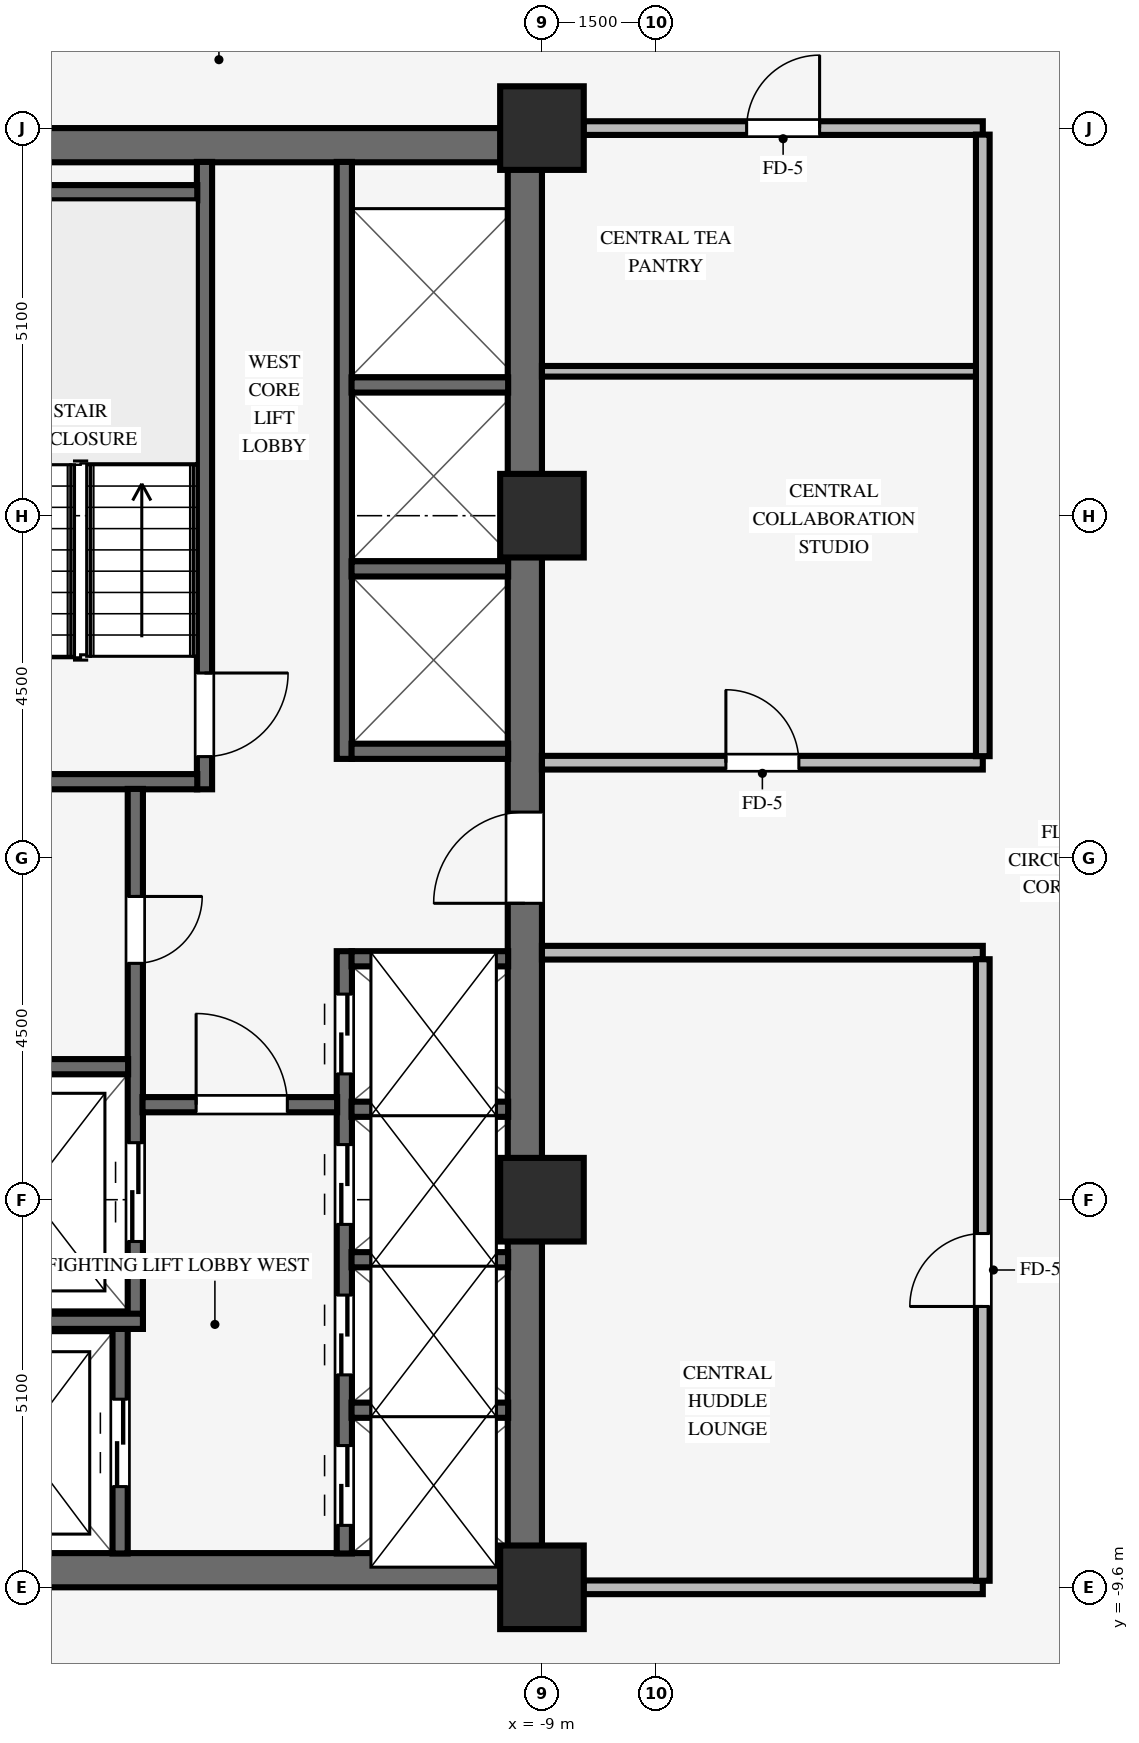
"""IFC4 building model, lengths in metres.
Left out: names, types, materials, properties, quantities, classifications, styles, units other than length and angle.
Written with IfcOpenShell. Run it as: python <this file> out.ifc"""

import sys

from ifc_helpers import new_model, si_unit, direction, frame, frame_2d, origin, origin_2d, place, context, subcontext, project, spatial, rectangle, extrude, source, transform, mapped, element, fill, save


model = new_model("IFC4")
c1 = context("Model", 3, precision=1e-05, world=origin(), true_north=direction((0.0, 1.0)))
c2 = subcontext(c1, "Body", "Model", "MODEL_VIEW")
j1 = project(units=[si_unit("LENGTHUNIT", "METRE"), si_unit("PLANEANGLEUNIT", "RADIAN")], contexts=[c1])
p1 = place(None, origin())
s1 = spatial("IfcSite", under=j1, at=p1, CompositionType="ELEMENT")
p2 = place(p1, origin())
s2 = spatial("IfcBuilding", under=s1, at=p2, CompositionType="ELEMENT")
p3 = place(p2, frame((0.0, 0.0, 64.1)))
s3 = spatial("IfcBuildingStorey", under=s2, at=p3, CompositionType="ELEMENT", Elevation=64.1)
for number, where, z_axis, x_axis in (
    (1, (-17.5, -9.375, 0.0), (0.0, 0.0, 1.0), (1.0, 0.0, 0.0)),
    (2, (-17.5, 9.375, 0.0), (0.0, 0.0, 1.0), (1.0, 0.0, 0.0)),
):
    element("IfcWall", number, at=place(p3, frame(where, z_axis=z_axis, x_axis=x_axis)), inside=s3, PredefinedType="SHEAR", context=c2, shape_type="SweptSolid", body=[
        extrude(rectangle(XDim=8.5, YDim=0.45, at=frame_2d((4.25, 0.0))), origin(), (0.0, 0.0, 1.0), 3.37),
    ])
p4 = place(p3, frame((-9.225, -9.155, 0.0), z_axis=(0.0, 0.0, 1.0), x_axis=(0.0, 1.0, 0.0)))
e3 = element("IfcWall", 3, at=p4, inside=s3, PredefinedType="SHEAR", context=c2, shape_type="SweptSolid", body=[
    extrude(rectangle(XDim=18.31, YDim=0.45, at=frame_2d((9.155, 0.0))), origin(), (0.0, 0.0, 1.0), 3.37),
])
p5 = place(p4, frame((8.555, 0.0, 0.0)))
e4 = element("IfcOpeningElement", 4, at=p5, cuts=e3, PredefinedType="OPENING", context=c2, shape_type="SweptSolid", body=[
    extrude(rectangle(XDim=1.2, YDim=2.15, at=frame_2d((0.6, 1.075))), frame((0.0, 0.235, 0.0), z_axis=(0.0, -1.0, 0.0), x_axis=(1.0, 0.0, 0.0)), (0.0, 0.0, 1.0), 0.47),
])
for number, where, z_axis, x_axis in (
    (5, (-9.0, -9.6, 0.0), (0.0, 0.0, 1.0), (1.0, 0.0, 0.0)),
    (6, (-9.0, -4.5, 0.0), (0.0, 0.0, 1.0), (1.0, 0.0, 0.0)),
    (7, (-9.0, 4.5, 0.0), (0.0, 0.0, 1.0), (1.0, 0.0, 0.0)),
    (8, (-9.0, 9.6, 0.0), (0.0, 0.0, 1.0), (1.0, 0.0, 0.0)),
):
    element("IfcColumn", number, at=place(p3, frame(where, z_axis=z_axis, x_axis=x_axis)), inside=s3, PredefinedType="COLUMN", context=c2, shape_type="SweptSolid", body=[
        extrude(rectangle(XDim=1.1, YDim=1.1, at=origin_2d()), origin(), (0.0, 0.0, 1.0), 3.37),
    ])
p6 = place(p3, frame((-13.44, 0.9, 0.0), z_axis=(0.0, 0.0, 1.0), x_axis=(0.0, 1.0, 0.0)))
e9 = element("IfcWall", 9, at=p6, inside=s3, PredefinedType="SHEAR", context=c2, shape_type="SweptSolid", body=[
    extrude(rectangle(XDim=8.255, YDim=0.2, at=frame_2d((4.127, 0.0))), origin(), (0.0, 0.0, 1.0), 3.37),
])
p7 = place(p6, frame((1.53, 0.0, 0.0), z_axis=(0.0, 0.0, 1.0), x_axis=(-1.0, 0.0, 0.0)))
e10 = element("IfcOpeningElement", 10, at=p7, cuts=e9, PredefinedType="OPENING", context=c2, shape_type="SweptSolid", body=[
    extrude(rectangle(XDim=1.1, YDim=2.15, at=frame_2d((0.55, 1.075))), frame((0.0, 0.11, 0.0), z_axis=(0.0, -1.0, 0.0), x_axis=(1.0, 0.0, 0.0)), (0.0, 0.0, 1.0), 0.22),
])
for number, where, z_axis, x_axis in (
    (11, (-17.055, 1.0, 0.0), (0.0, 0.0, 1.0), (1.0, 0.0, 0.0)),
    (12, (-17.055, 8.75, 0.0), (0.0, 0.0, 1.0), (1.0, 0.0, 0.0)),
):
    element("IfcWall", number, at=place(p3, frame(where, z_axis=z_axis, x_axis=x_axis)), inside=s3, PredefinedType="SHEAR", context=c2, shape_type="SweptSolid", body=[
        extrude(rectangle(XDim=3.52, YDim=0.2, at=frame_2d((1.76, 0.0))), origin(), (0.0, 0.0, 1.0), 3.37),
    ])
p8 = place(p3, frame((-14.55, -9.155, 0.0), z_axis=(0.0, 0.0, 1.0), x_axis=(0.0, 1.0, 0.0)))
e13 = element("IfcWall", 13, at=p8, inside=s3, PredefinedType="SHEAR", context=c2, shape_type="SweptSolid", body=[
    extrude(rectangle(XDim=2.96, YDim=0.2, at=frame_2d((1.48, 0.0))), origin(), (0.0, 0.0, 1.0), 3.37),
])
p9 = place(p8, frame((0.88, 0.0, 0.0)))
e14 = element("IfcOpeningElement", 14, at=p9, cuts=e13, PredefinedType="OPENING", context=c2, shape_type="SweptSolid", body=[
    extrude(rectangle(XDim=1.15, YDim=2.15, at=frame_2d((0.575, 1.075))), frame((0.0, 0.11, 0.0), z_axis=(0.0, -1.0, 0.0), x_axis=(1.0, 0.0, 0.0)), (0.0, 0.0, 1.0), 0.22),
])
p10 = place(p3, frame((-14.35, -6.2, 0.0), z_axis=(0.0, 0.0, 1.0), x_axis=(0.0, 1.0, 0.0)))
e15 = element("IfcWall", 15, at=p10, inside=s3, PredefinedType="SHEAR", context=c2, shape_type="SweptSolid", body=[
    extrude(rectangle(XDim=7.105, YDim=0.2, at=frame_2d((3.552, 0.0))), origin(), (0.0, 0.0, 1.0), 3.37),
])
p11 = place(p10, frame((5.69, 0.0, 0.0), z_axis=(0.0, 0.0, 1.0), x_axis=(-1.0, 0.0, 0.0)))
e16 = element("IfcOpeningElement", 16, at=p11, cuts=e15, PredefinedType="OPENING", context=c2, shape_type="SweptSolid", body=[
    extrude(rectangle(XDim=0.88, YDim=2.1, at=frame_2d((0.44, 1.05))), frame((0.0, 0.11, 0.0), z_axis=(0.0, -1.0, 0.0), x_axis=(1.0, 0.0, 0.0)), (0.0, 0.0, 1.0), 0.22),
])
p12 = place(p10, frame((1.15, 0.0, 0.0)))
e17 = element("IfcOpeningElement", 17, at=p12, cuts=e15, PredefinedType="OPENING", context=c2, shape_type="SweptSolid", body=[
    extrude(rectangle(XDim=1.3, YDim=2.2, at=frame_2d((0.65, 1.1))), frame((0.0, 0.11, 0.0), z_axis=(0.0, -1.0, 0.0), x_axis=(1.0, 0.0, 0.0)), (0.0, 0.0, 1.0), 0.22),
])
p13 = place(p3, frame((-17.055, -6.1, 0.0), z_axis=(0.0, 0.0, 1.0), x_axis=(1.0, 0.0, 0.0)))
e18 = element("IfcWall", 18, at=p13, inside=s3, PredefinedType="SHEAR", context=c2, shape_type="SweptSolid", body=[
    extrude(rectangle(XDim=2.805, YDim=0.2, at=frame_2d((1.402, 0.0))), origin(), (0.0, 0.0, 1.0), 3.37),
])
p14 = place(p3, frame((-17.055, -2.75, 0.0), z_axis=(0.0, 0.0, 1.0), x_axis=(1.0, 0.0, 0.0)))
e19 = element("IfcWall", 19, at=p14, inside=s3, PredefinedType="SHEAR", context=c2, shape_type="SweptSolid", body=[
    extrude(rectangle(XDim=2.61, YDim=0.2, at=frame_2d((1.305, 0.0))), origin(), (0.0, 0.0, 1.0), 3.37),
])
p15 = place(p3, frame((-11.6, -9.155, 0.0), z_axis=(0.0, 0.0, 1.0), x_axis=(0.0, 1.0, 0.0)))
e20 = element("IfcWall", 20, at=p15, inside=s3, PredefinedType="SHEAR", context=c2, shape_type="SweptSolid", body=[
    extrude(rectangle(XDim=7.925, YDim=0.2, at=frame_2d((3.962, 0.0))), origin(), (0.0, 0.0, 1.0), 3.37),
])
p16 = place(p15, frame((0.37, 0.0, 0.0)))
e21 = element("IfcOpeningElement", 21, at=p16, cuts=e20, PredefinedType="OPENING", context=c2, shape_type="SweptSolid", body=[
    extrude(rectangle(XDim=1.05, YDim=2.15, at=frame_2d((0.525, 1.075))), frame((0.0, 0.11, 0.0), z_axis=(0.0, -1.0, 0.0), x_axis=(1.0, 0.0, 0.0)), (0.0, 0.0, 1.0), 0.22),
])
p17 = place(p15, frame((2.35, 0.0, 0.0)))
e22 = element("IfcOpeningElement", 22, at=p17, cuts=e20, PredefinedType="OPENING", context=c2, shape_type="SweptSolid", body=[
    extrude(rectangle(XDim=1.05, YDim=2.15, at=frame_2d((0.525, 1.075))), frame((0.0, 0.11, 0.0), z_axis=(0.0, -1.0, 0.0), x_axis=(1.0, 0.0, 0.0)), (0.0, 0.0, 1.0), 0.22),
])
p18 = place(p15, frame((4.33, 0.0, 0.0)))
e23 = element("IfcOpeningElement", 23, at=p18, cuts=e20, PredefinedType="OPENING", context=c2, shape_type="SweptSolid", body=[
    extrude(rectangle(XDim=1.05, YDim=2.15, at=frame_2d((0.525, 1.075))), frame((0.0, 0.11, 0.0), z_axis=(0.0, -1.0, 0.0), x_axis=(1.0, 0.0, 0.0)), (0.0, 0.0, 1.0), 0.22),
])
p19 = place(p15, frame((6.31, 0.0, 0.0)))
e24 = element("IfcOpeningElement", 24, at=p19, cuts=e20, PredefinedType="OPENING", context=c2, shape_type="SweptSolid", body=[
    extrude(rectangle(XDim=1.05, YDim=2.15, at=frame_2d((0.525, 1.075))), frame((0.0, 0.11, 0.0), z_axis=(0.0, -1.0, 0.0), x_axis=(1.0, 0.0, 0.0)), (0.0, 0.0, 1.0), 0.22),
])
p20 = place(p3, frame((-14.255, -3.25, 0.0), z_axis=(0.0, 0.0, 1.0), x_axis=(1.0, 0.0, 0.0)))
e25 = element("IfcWall", 25, at=p20, inside=s3, PredefinedType="SHEAR", context=c2, shape_type="SweptSolid", body=[
    extrude(rectangle(XDim=2.56, YDim=0.2, at=frame_2d((1.28, 0.0))), origin(), (0.0, 0.0, 1.0), 3.37),
])
p21 = place(p20, frame((0.705, 0.0, 0.0)))
e26 = element("IfcOpeningElement", 26, at=p21, cuts=e25, PredefinedType="OPENING", context=c2, shape_type="SweptSolid", body=[
    extrude(rectangle(XDim=1.2, YDim=2.15, at=frame_2d((0.6, 1.075))), frame((0.0, 0.11, 0.0), z_axis=(0.0, -1.0, 0.0), x_axis=(1.0, 0.0, 0.0)), (0.0, 0.0, 1.0), 0.22),
])
for number, where, z_axis, x_axis in (
    (27, (-11.505, -7.27, 0.0), (0.0, 0.0, 1.0), (1.0, 0.0, 0.0)),
    (28, (-11.505, -5.29, 0.0), (0.0, 0.0, 1.0), (1.0, 0.0, 0.0)),
    (29, (-11.505, -3.31, 0.0), (0.0, 0.0, 1.0), (1.0, 0.0, 0.0)),
    (30, (-11.505, -1.33, 0.0), (0.0, 0.0, 1.0), (1.0, 0.0, 0.0)),
):
    element("IfcWall", number, at=place(p3, frame(where, z_axis=z_axis, x_axis=x_axis)), inside=s3, PredefinedType="SHEAR", context=c2, shape_type="SweptSolid", body=[
        extrude(rectangle(XDim=2.06, YDim=0.2, at=frame_2d((1.03, 0.0))), origin(), (0.0, 0.0, 1.0), 3.37),
    ])
p22 = place(p3, frame((-11.6, 1.3, 0.0), z_axis=(0.0, 0.0, 1.0), x_axis=(0.0, 1.0, 0.0)))
e31 = element("IfcWall", 31, at=p22, inside=s3, PredefinedType="SHEAR", context=c2, shape_type="SweptSolid", body=[
    extrude(rectangle(XDim=7.855, YDim=0.2, at=frame_2d((3.927, 0.0))), origin(), (0.0, 0.0, 1.0), 3.37),
])
for number, where, z_axis, x_axis in (
    (32, (-11.505, 1.4, 0.0), (0.0, 0.0, 1.0), (1.0, 0.0, 0.0)),
    (33, (-11.505, 3.8, 0.0), (0.0, 0.0, 1.0), (1.0, 0.0, 0.0)),
    (34, (-11.505, 6.22, 0.0), (0.0, 0.0, 1.0), (1.0, 0.0, 0.0)),
):
    element("IfcWall", number, at=place(p3, frame(where, z_axis=z_axis, x_axis=x_axis)), inside=s3, PredefinedType="SHEAR", context=c2, shape_type="SweptSolid", body=[
        extrude(rectangle(XDim=2.06, YDim=0.2, at=frame_2d((1.03, 0.0))), origin(), (0.0, 0.0, 1.0), 3.37),
    ])
p23 = place(p3, frame((-8.454, -9.6, 0.0), z_axis=(0.0, 0.0, 1.0), x_axis=(1.0, 0.0, 0.0)))
e35 = element("IfcWall", 35, at=p23, inside=s3, PredefinedType="PARTITIONING", context=c2, shape_type="SweptSolid", body=[
    extrude(rectangle(XDim=5.254, YDim=0.18, at=frame_2d((2.627, 0.0))), origin(), (0.0, 0.0, 1.0), 2.405),
])
p24 = place(p3, frame((-9.0, -1.25, 0.0), z_axis=(0.0, 0.0, 1.0), x_axis=(1.0, 0.0, 0.0)))
e36 = element("IfcWall", 36, at=p24, inside=s3, PredefinedType="PARTITIONING", context=c2, shape_type="SweptSolid", body=[
    extrude(rectangle(XDim=5.8, YDim=0.18, at=frame_2d((2.9, 0.0))), origin(), (0.0, 0.0, 1.0), 3.36),
])
p25 = place(p3, frame((-9.0, 1.25, 0.0), z_axis=(0.0, 0.0, 1.0), x_axis=(1.0, 0.0, 0.0)))
e37 = element("IfcWall", 37, at=p25, inside=s3, PredefinedType="PARTITIONING", context=c2, shape_type="SweptSolid", body=[
    extrude(rectangle(XDim=5.8, YDim=0.18, at=frame_2d((2.9, 0.0))), origin(), (0.0, 0.0, 1.0), 3.36),
])
p26 = place(p25, frame((2.42, 0.0, 0.0)))
e38 = element("IfcOpeningElement", 38, at=p26, cuts=e37, PredefinedType="OPENING", context=c2, shape_type="SweptSolid", body=[
    extrude(rectangle(XDim=0.96, YDim=2.1, at=frame_2d((0.48, 1.05))), frame((0.0, 0.1, 0.0), z_axis=(0.0, -1.0, 0.0), x_axis=(1.0, 0.0, 0.0)), (0.0, 0.0, 1.0), 0.2),
])
p27 = place(p3, frame((-9.0, 6.4, 0.0), z_axis=(0.0, 0.0, 1.0), x_axis=(1.0, 0.0, 0.0)))
e39 = element("IfcWall", 39, at=p27, inside=s3, PredefinedType="PARTITIONING", context=c2, shape_type="SweptSolid", body=[
    extrude(rectangle(XDim=5.714, YDim=0.14, at=frame_2d((2.857, 0.0))), origin(), (0.0, 0.0, 1.0), 3.36),
])
p28 = place(p3, frame((-8.454, 9.6, 0.0), z_axis=(0.0, 0.0, 1.0), x_axis=(1.0, 0.0, 0.0)))
e40 = element("IfcWall", 40, at=p28, inside=s3, PredefinedType="PARTITIONING", context=c2, shape_type="SweptSolid", body=[
    extrude(rectangle(XDim=5.254, YDim=0.18, at=frame_2d((2.627, 0.0))), origin(), (0.0, 0.0, 1.0), 2.405),
])
p29 = place(p28, frame((2.147, 0.0, 0.0)))
e41 = element("IfcOpeningElement", 41, at=p29, cuts=e40, PredefinedType="OPENING", context=c2, shape_type="SweptSolid", body=[
    extrude(rectangle(XDim=0.96, YDim=2.1, at=frame_2d((0.48, 1.05))), frame((0.0, 0.1, 0.0), z_axis=(0.0, -1.0, 0.0), x_axis=(1.0, 0.0, 0.0)), (0.0, 0.0, 1.0), 0.2),
])
p30 = place(p3, frame((-3.2, -9.514, 0.0), z_axis=(0.0, 0.0, 1.0), x_axis=(0.0, 1.0, 0.0)))
e42 = element("IfcWall", 42, at=p30, inside=s3, PredefinedType="PARTITIONING", context=c2, shape_type="SweptSolid", body=[
    extrude(rectangle(XDim=8.178, YDim=0.18, at=frame_2d((4.089, 0.0))), origin(), (0.0, 0.0, 1.0), 3.36),
])
p31 = place(p30, frame((3.609, 0.0, 0.0)))
e43 = element("IfcOpeningElement", 43, at=p31, cuts=e42, PredefinedType="OPENING", context=c2, shape_type="SweptSolid", body=[
    extrude(rectangle(XDim=0.96, YDim=2.1, at=frame_2d((0.48, 1.05))), frame((0.0, 0.1, 0.0), z_axis=(0.0, -1.0, 0.0), x_axis=(1.0, 0.0, 0.0)), (0.0, 0.0, 1.0), 0.2),
])
p32 = place(p3, frame((-3.2, 1.336, 0.0), z_axis=(0.0, 0.0, 1.0), x_axis=(0.0, 1.0, 0.0)))
e44 = element("IfcWall", 44, at=p32, inside=s3, PredefinedType="PARTITIONING", context=c2, shape_type="SweptSolid", body=[
    extrude(rectangle(XDim=8.178, YDim=0.18, at=frame_2d((4.089, 0.0))), origin(), (0.0, 0.0, 1.0), 3.36),
])
m1 = source(origin(), c2, "Body", "SweptSolid", [
    extrude(rectangle(XDim=1.1, YDim=2.15, at=frame_2d((0.55, 1.075))), frame((0.0, 0.025, 0.0), z_axis=(0.0, -1.0, 0.0), x_axis=(1.0, 0.0, 0.0)), (0.0, 0.0, 1.0), 0.05),
])
p33 = place(p7, origin())
e45 = element("IfcDoor", 45, at=p33, inside=s3, OperationType="SINGLE_SWING_LEFT", PredefinedType="DOOR", context=c2, shape_type="MappedRepresentation", body=[
    mapped(m1, transform((0.0, 0.0, 0.0), scale=1.0)),
])
fill(e10, e45)
m2 = source(origin(), c2, "Body", "SweptSolid", [
    extrude(rectangle(XDim=0.88, YDim=2.1, at=frame_2d((0.44, 1.05))), frame((0.0, 0.025, 0.0), z_axis=(0.0, -1.0, 0.0), x_axis=(1.0, 0.0, 0.0)), (0.0, 0.0, 1.0), 0.05),
])
p34 = place(p11, origin())
e46 = element("IfcDoor", 46, at=p34, inside=s3, OperationType="SINGLE_SWING_LEFT", PredefinedType="DOOR", context=c2, shape_type="MappedRepresentation", body=[
    mapped(m2, transform((0.0, 0.0, 0.0), scale=1.0)),
])
fill(e16, e46)
m3 = source(origin(), c2, "Body", "SweptSolid", [
    extrude(rectangle(XDim=1.2, YDim=2.15, at=frame_2d((0.6, 1.075))), frame((0.0, 0.025, 0.0), z_axis=(0.0, -1.0, 0.0), x_axis=(1.0, 0.0, 0.0)), (0.0, 0.0, 1.0), 0.05),
])
p35 = place(p21, origin())
e47 = element("IfcDoor", 47, at=p35, inside=s3, OperationType="SINGLE_SWING_LEFT", PredefinedType="DOOR", context=c2, shape_type="MappedRepresentation", body=[
    mapped(m3, transform((0.0, 0.0, 0.0), scale=1.0)),
])
fill(e26, e47)
p36 = place(p5, origin())
e48 = element("IfcDoor", 48, at=p36, inside=s3, OperationType="SINGLE_SWING_LEFT", PredefinedType="DOOR", context=c2, shape_type="MappedRepresentation", body=[
    mapped(m3, transform((0.0, 0.0, 0.0), scale=1.0)),
])
fill(e4, e48)
m4 = source(origin(), c2, "Body", "SweptSolid", [
    extrude(rectangle(XDim=1.15, YDim=2.15, at=frame_2d((0.575, 1.075))), frame((0.0, 0.025, 0.0), z_axis=(0.0, -1.0, 0.0), x_axis=(1.0, 0.0, 0.0)), (0.0, 0.0, 1.0), 0.05),
])
p37 = place(p9, origin())
e49 = element("IfcDoor", 49, at=p37, inside=s3, OperationType="DOUBLE_DOOR_SLIDING", PredefinedType="DOOR", context=c2, shape_type="MappedRepresentation", body=[
    mapped(m4, transform((0.0, 0.0, 0.0), scale=1.0)),
])
fill(e14, e49)
m5 = source(origin(), c2, "Body", "SweptSolid", [
    extrude(rectangle(XDim=1.3, YDim=2.2, at=frame_2d((0.65, 1.1))), frame((0.0, 0.025, 0.0), z_axis=(0.0, -1.0, 0.0), x_axis=(1.0, 0.0, 0.0)), (0.0, 0.0, 1.0), 0.05),
])
p38 = place(p12, origin())
e50 = element("IfcDoor", 50, at=p38, inside=s3, OperationType="DOUBLE_DOOR_SLIDING", PredefinedType="DOOR", context=c2, shape_type="MappedRepresentation", body=[
    mapped(m5, transform((0.0, 0.0, 0.0), scale=1.0)),
])
fill(e17, e50)
m6 = source(origin(), c2, "Body", "SweptSolid", [
    extrude(rectangle(XDim=1.05, YDim=2.15, at=frame_2d((0.525, 1.075))), frame((0.0, 0.025, 0.0), z_axis=(0.0, -1.0, 0.0), x_axis=(1.0, 0.0, 0.0)), (0.0, 0.0, 1.0), 0.05),
])
p39 = place(p16, origin())
e51 = element("IfcDoor", 51, at=p39, inside=s3, OperationType="DOUBLE_DOOR_SLIDING", PredefinedType="DOOR", context=c2, shape_type="MappedRepresentation", body=[
    mapped(m6, transform((0.0, 0.0, 0.0), scale=1.0)),
])
fill(e21, e51)
p40 = place(p17, origin())
e52 = element("IfcDoor", 52, at=p40, inside=s3, OperationType="DOUBLE_DOOR_SLIDING", PredefinedType="DOOR", context=c2, shape_type="MappedRepresentation", body=[
    mapped(m6, transform((0.0, 0.0, 0.0), scale=1.0)),
])
fill(e22, e52)
p41 = place(p18, origin())
e53 = element("IfcDoor", 53, at=p41, inside=s3, OperationType="DOUBLE_DOOR_SLIDING", PredefinedType="DOOR", context=c2, shape_type="MappedRepresentation", body=[
    mapped(m6, transform((0.0, 0.0, 0.0), scale=1.0)),
])
fill(e23, e53)
p42 = place(p19, origin())
e54 = element("IfcDoor", 54, at=p42, inside=s3, OperationType="DOUBLE_DOOR_SLIDING", PredefinedType="DOOR", context=c2, shape_type="MappedRepresentation", body=[
    mapped(m6, transform((0.0, 0.0, 0.0), scale=1.0)),
])
fill(e24, e54)
m7 = source(origin(), c2, "Body", "SweptSolid", [
    extrude(rectangle(XDim=0.96, YDim=2.1, at=frame_2d((0.48, 1.05))), frame((0.0, 0.025, 0.0), z_axis=(0.0, -1.0, 0.0), x_axis=(1.0, 0.0, 0.0)), (0.0, 0.0, 1.0), 0.05),
])
p43 = place(p31, origin())
e55 = element("IfcDoor", 55, at=p43, inside=s3, OperationType="SINGLE_SWING_LEFT", PredefinedType="DOOR", context=c2, shape_type="MappedRepresentation", body=[
    mapped(m7, transform((0.0, 0.0, 0.0), scale=1.0)),
])
fill(e43, e55)
p44 = place(p26, origin())
e56 = element("IfcDoor", 56, at=p44, inside=s3, OperationType="SINGLE_SWING_LEFT", PredefinedType="DOOR", context=c2, shape_type="MappedRepresentation", body=[
    mapped(m7, transform((0.0, 0.0, 0.0), scale=1.0)),
])
fill(e38, e56)
p45 = place(p29, origin())
e57 = element("IfcDoor", 57, at=p45, inside=s3, OperationType="SINGLE_SWING_RIGHT", PredefinedType="DOOR", context=c2, shape_type="MappedRepresentation", body=[
    mapped(m7, transform((0.0, 0.0, 0.0), scale=1.0)),
])
fill(e41, e57)
save(model, sys.argv[1])
